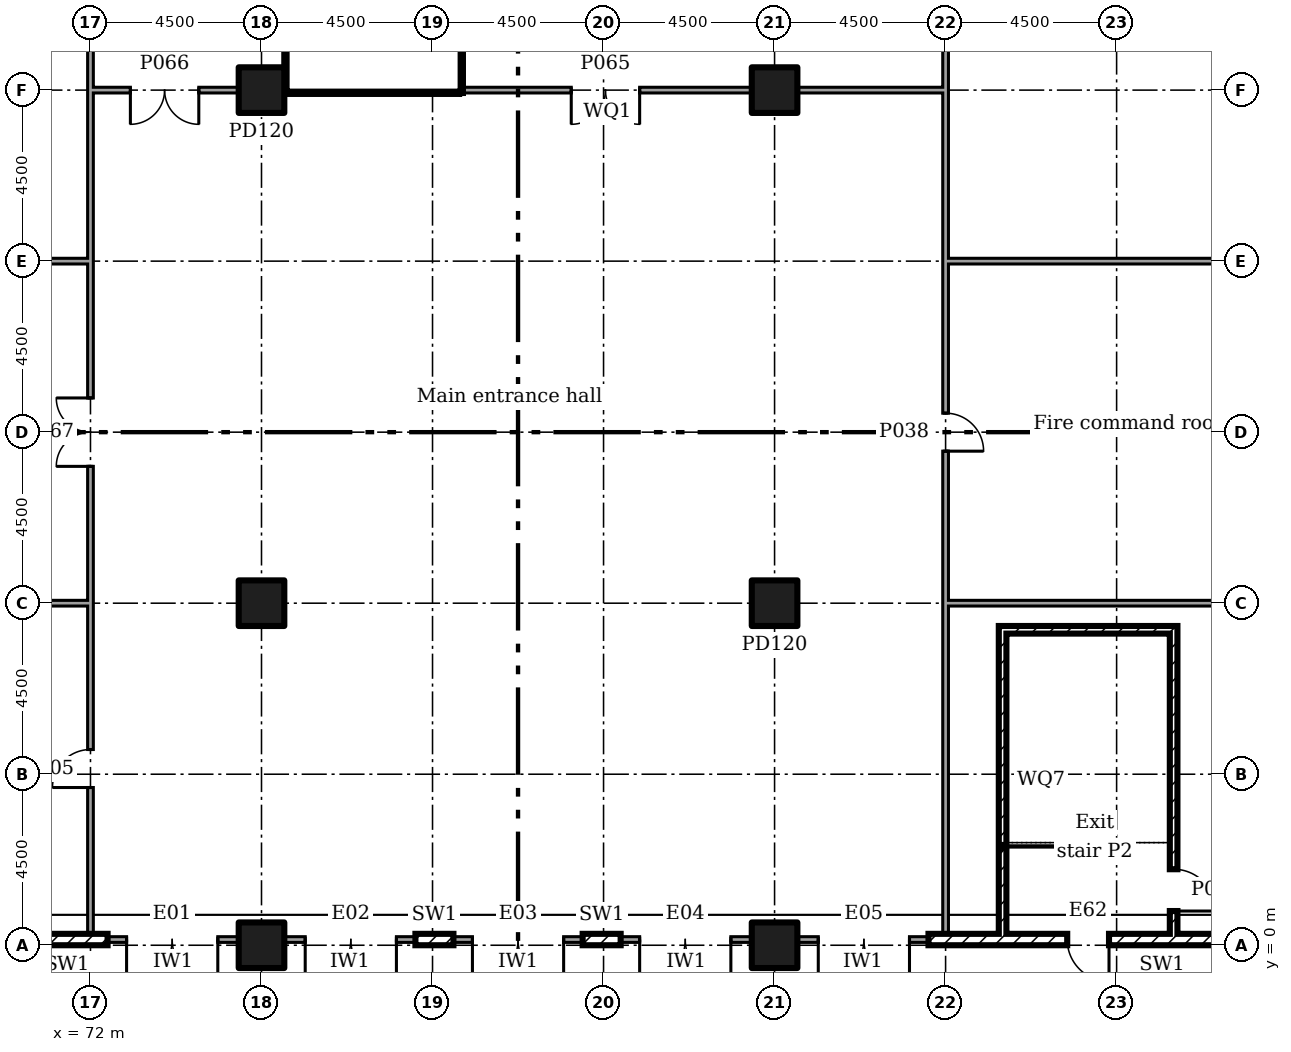
"""IFC4 building model, lengths in metres.
Left out: names, types, materials, properties, quantities, classifications, styles, units other than length and angle.
Written with IfcOpenShell. Run it as: python <this file> out.ifc"""

import sys

from ifc_helpers import new_model, si_unit, direction, frame, frame_2d, origin, origin_2d, place, context, subcontext, project, spatial, rectangle, extrude, element, fill, save


model = new_model("IFC4")
c1 = context("Model", 3, precision=1e-05, world=origin(), true_north=direction((0.0, 1.0)))
c2 = subcontext(c1, "Body", "Model", "MODEL_VIEW")
j1 = project(units=[si_unit("LENGTHUNIT", "METRE"), si_unit("PLANEANGLEUNIT", "RADIAN")], contexts=[c1])
p1 = place(None, origin())
s1 = spatial("IfcSite", under=j1, at=p1, CompositionType="ELEMENT")
p2 = place(p1, origin())
s2 = spatial("IfcBuilding", under=s1, at=p2, CompositionType="ELEMENT")
p3 = place(p2, origin())
s3 = spatial("IfcBuildingStorey", under=s2, at=p3, CompositionType="ELEMENT", Elevation=0.0)
for number, where in (
    (1, (76.5, 0.0, 0.0)),
    (2, (76.5, 9.0, 0.0)),
    (3, (76.5, 22.5, 0.0)),
    (4, (90.0, 0.0, 0.0)),
    (5, (90.0, 9.0, 0.0)),
    (6, (90.0, 22.5, 0.0)),
):
    element("IfcColumn", number, at=place(p3, frame(where)), inside=s3, PredefinedType="COLUMN", context=c2, shape_type="SweptSolid", body=[
        extrude(rectangle(XDim=1.2, YDim=1.2, at=origin_2d()), origin(), (0.0, 0.0, 1.0), 6.0),
    ])
p4 = place(p3, frame((70.3, 0.15, 0.0)))
e7 = element("IfcWall", 7, at=p4, inside=s3, PredefinedType="ELEMENTEDWALL", context=c2, shape_type="SweptSolid", body=[
    extrude(rectangle(XDim=2.15, YDim=0.3, at=frame_2d((1.075, 0.0))), origin(), (0.0, 0.0, 1.0), 5.55),
])
p5 = place(p3, frame((72.45, 0.15, 0.0)))
e8 = element("IfcWall", 8, at=p5, inside=s3, PredefinedType="SOLIDWALL", context=c2, shape_type="SweptSolid", body=[
    extrude(rectangle(XDim=3.45, YDim=0.15, at=frame_2d((1.725, 0.0))), origin(), (0.0, 0.0, 1.0), 5.55),
])
p6 = place(p5, frame((0.5, 0.0, 0.0)))
e9 = element("IfcOpeningElement", 9, at=p6, cuts=e8, PredefinedType="OPENING", context=c2, shape_type="SweptSolid", body=[
    extrude(rectangle(XDim=2.4, YDim=2.7, at=frame_2d((1.2, 1.35))), frame((0.0, 0.085, 0.0), z_axis=(0.0, -1.0, 0.0), x_axis=(1.0, 0.0, 0.0)), (0.0, 0.0, 1.0), 0.17),
])
p7 = place(p3, frame((77.1, 0.15, 0.0)))
e10 = element("IfcWall", 10, at=p7, inside=s3, PredefinedType="SOLIDWALL", context=c2, shape_type="SweptSolid", body=[
    extrude(rectangle(XDim=3.45, YDim=0.15, at=frame_2d((1.725, 0.0))), origin(), (0.0, 0.0, 1.0), 5.55),
])
p8 = place(p7, frame((0.55, 0.0, 0.0)))
e11 = element("IfcOpeningElement", 11, at=p8, cuts=e10, PredefinedType="OPENING", context=c2, shape_type="SweptSolid", body=[
    extrude(rectangle(XDim=2.4, YDim=2.7, at=frame_2d((1.2, 1.35))), frame((0.0, 0.085, 0.0), z_axis=(0.0, -1.0, 0.0), x_axis=(1.0, 0.0, 0.0)), (0.0, 0.0, 1.0), 0.17),
])
p9 = place(p3, frame((80.55, 0.15, 0.0)))
e12 = element("IfcWall", 12, at=p9, inside=s3, PredefinedType="ELEMENTEDWALL", context=c2, shape_type="SweptSolid", body=[
    extrude(rectangle(XDim=1.0, YDim=0.3, at=frame_2d((0.5, 0.0))), origin(), (0.0, 0.0, 1.0), 5.55),
])
p10 = place(p3, frame((81.55, 0.15, 0.0)))
e13 = element("IfcWall", 13, at=p10, inside=s3, PredefinedType="SOLIDWALL", context=c2, shape_type="SweptSolid", body=[
    extrude(rectangle(XDim=3.4, YDim=0.15, at=frame_2d((1.7, 0.0))), origin(), (0.0, 0.0, 1.0), 5.55),
])
p11 = place(p10, frame((0.5, 0.0, 0.0)))
e14 = element("IfcOpeningElement", 14, at=p11, cuts=e13, PredefinedType="OPENING", context=c2, shape_type="SweptSolid", body=[
    extrude(rectangle(XDim=2.4, YDim=2.7, at=frame_2d((1.2, 1.35))), frame((0.0, 0.085, 0.0), z_axis=(0.0, -1.0, 0.0), x_axis=(1.0, 0.0, 0.0)), (0.0, 0.0, 1.0), 0.17),
])
p12 = place(p3, frame((84.95, 0.15, 0.0)))
e15 = element("IfcWall", 15, at=p12, inside=s3, PredefinedType="ELEMENTEDWALL", context=c2, shape_type="SweptSolid", body=[
    extrude(rectangle(XDim=1.0, YDim=0.3, at=frame_2d((0.5, 0.0))), origin(), (0.0, 0.0, 1.0), 5.55),
])
p13 = place(p3, frame((85.95, 0.15, 0.0)))
e16 = element("IfcWall", 16, at=p13, inside=s3, PredefinedType="SOLIDWALL", context=c2, shape_type="SweptSolid", body=[
    extrude(rectangle(XDim=3.45, YDim=0.15, at=frame_2d((1.725, 0.0))), origin(), (0.0, 0.0, 1.0), 5.55),
])
p14 = place(p13, frame((0.5, 0.0, 0.0)))
e17 = element("IfcOpeningElement", 17, at=p14, cuts=e16, PredefinedType="OPENING", context=c2, shape_type="SweptSolid", body=[
    extrude(rectangle(XDim=2.4, YDim=2.7, at=frame_2d((1.2, 1.35))), frame((0.0, 0.085, 0.0), z_axis=(0.0, -1.0, 0.0), x_axis=(1.0, 0.0, 0.0)), (0.0, 0.0, 1.0), 0.17),
])
p15 = place(p3, frame((90.6, 0.15, 0.0)))
e18 = element("IfcWall", 18, at=p15, inside=s3, PredefinedType="SOLIDWALL", context=c2, shape_type="SweptSolid", body=[
    extrude(rectangle(XDim=3.45, YDim=0.15, at=frame_2d((1.725, 0.0))), origin(), (0.0, 0.0, 1.0), 5.55),
])
p16 = place(p15, frame((0.55, 0.0, 0.0)))
e19 = element("IfcOpeningElement", 19, at=p16, cuts=e18, PredefinedType="OPENING", context=c2, shape_type="SweptSolid", body=[
    extrude(rectangle(XDim=2.4, YDim=2.7, at=frame_2d((1.2, 1.35))), frame((0.0, 0.085, 0.0), z_axis=(0.0, -1.0, 0.0), x_axis=(1.0, 0.0, 0.0)), (0.0, 0.0, 1.0), 0.17),
])
p17 = place(p3, frame((94.05, 0.15, 0.0)))
e20 = element("IfcWall", 20, at=p17, inside=s3, PredefinedType="ELEMENTEDWALL", context=c2, shape_type="SweptSolid", body=[
    extrude(rectangle(XDim=3.15, YDim=0.3, at=frame_2d((1.575, 0.0))), origin(), (0.0, 0.0, 1.0), 5.55),
])
p18 = place(p3, frame((97.2, 0.15, 0.0)))
e21 = element("IfcWall", 21, at=p18, inside=s3, PredefinedType="ELEMENTEDWALL", context=c2, shape_type="SweptSolid", body=[
    extrude(rectangle(XDim=2.1, YDim=0.3, at=frame_2d((1.05, 0.0))), origin(), (0.0, 0.0, 1.0), 5.55),
])
p19 = place(p18, frame((0.5, 0.0, 0.0)))
e22 = element("IfcOpeningElement", 22, at=p19, cuts=e21, PredefinedType="OPENING", context=c2, shape_type="SweptSolid", body=[
    extrude(rectangle(XDim=1.1, YDim=2.4, at=frame_2d((0.55, 1.2))), frame((0.0, 0.16, 0.0), z_axis=(0.0, -1.0, 0.0), x_axis=(1.0, 0.0, 0.0)), (0.0, 0.0, 1.0), 0.32),
])
p20 = place(p3, frame((99.3, 0.15, 0.0)))
e23 = element("IfcWall", 23, at=p20, inside=s3, PredefinedType="ELEMENTEDWALL", context=c2, shape_type="SweptSolid", body=[
    extrude(rectangle(XDim=3.6, YDim=0.3, at=frame_2d((1.8, 0.0))), origin(), (0.0, 0.0, 1.0), 5.55),
])
p21 = place(p3, frame((71.925, 22.5, 0.0)))
e24 = element("IfcWall", 24, at=p21, inside=s3, PredefinedType="PARTITIONING", context=c2, shape_type="SweptSolid", body=[
    extrude(rectangle(XDim=3.98, YDim=0.15, at=frame_2d((1.99, 0.0))), origin(), (0.0, 0.0, 1.0), 5.55),
])
p22 = place(p21, frame((1.125, 0.0, 0.0)))
e25 = element("IfcOpeningElement", 25, at=p22, cuts=e24, PredefinedType="OPENING", context=c2, shape_type="SweptSolid", body=[
    extrude(rectangle(XDim=1.8, YDim=2.1, at=frame_2d((0.9, 1.05))), frame((0.0, 0.085, 0.0), z_axis=(0.0, -1.0, 0.0), x_axis=(1.0, 0.0, 0.0)), (0.0, 0.0, 1.0), 0.17),
])
p23 = place(p3, frame((81.8, 22.5, 0.0)))
e26 = element("IfcWall", 26, at=p23, inside=s3, PredefinedType="PARTITIONING", context=c2, shape_type="SweptSolid", body=[
    extrude(rectangle(XDim=7.605, YDim=0.15, at=frame_2d((3.802, 0.0))), origin(), (0.0, 0.0, 1.0), 5.55),
])
p24 = place(p23, frame((2.85, 0.0, 0.0)))
e27 = element("IfcOpeningElement", 27, at=p24, cuts=e26, PredefinedType="OPENING", context=c2, shape_type="SweptSolid", body=[
    extrude(rectangle(XDim=1.8, YDim=2.1, at=frame_2d((0.9, 1.05))), frame((0.0, 0.085, 0.0), z_axis=(0.0, -1.0, 0.0), x_axis=(1.0, 0.0, 0.0)), (0.0, 0.0, 1.0), 0.17),
])
p25 = place(p3, frame((90.595, 22.5, 0.0)))
e28 = element("IfcWall", 28, at=p25, inside=s3, PredefinedType="PARTITIONING", context=c2, shape_type="SweptSolid", body=[
    extrude(rectangle(XDim=3.98, YDim=0.15, at=frame_2d((1.99, 0.0))), origin(), (0.0, 0.0, 1.0), 5.55),
])
p26 = place(p3, frame((72.0, 0.3, 0.0), z_axis=(0.0, 0.0, 1.0), x_axis=(0.0, 1.0, 0.0)))
e29 = element("IfcWall", 29, at=p26, inside=s3, PredefinedType="PARTITIONING", context=c2, shape_type="SweptSolid", body=[
    extrude(rectangle(XDim=8.775, YDim=0.15, at=frame_2d((4.387, 0.0))), origin(), (0.0, 0.0, 1.0), 5.55),
])
p27 = place(p26, frame((3.85, 0.0, 0.0)))
e30 = element("IfcOpeningElement", 30, at=p27, cuts=e29, PredefinedType="OPENING", context=c2, shape_type="SweptSolid", body=[
    extrude(rectangle(XDim=1.0, YDim=2.1, at=frame_2d((0.5, 1.05))), frame((0.0, 0.085, 0.0), z_axis=(0.0, -1.0, 0.0), x_axis=(1.0, 0.0, 0.0)), (0.0, 0.0, 1.0), 0.17),
])
p28 = place(p3, frame((72.0, 9.0, 0.0), z_axis=(0.0, 0.0, 1.0), x_axis=(0.0, 1.0, 0.0)))
e31 = element("IfcWall", 31, at=p28, inside=s3, PredefinedType="PARTITIONING", context=c2, shape_type="SweptSolid", body=[
    extrude(rectangle(XDim=9.075, YDim=0.15, at=frame_2d((4.538, 0.0))), origin(), (0.0, 0.0, 1.0), 5.55),
])
p29 = place(p28, frame((3.6, 0.0, 0.0)))
e32 = element("IfcOpeningElement", 32, at=p29, cuts=e31, PredefinedType="OPENING", context=c2, shape_type="SweptSolid", body=[
    extrude(rectangle(XDim=1.8, YDim=2.1, at=frame_2d((0.9, 1.05))), frame((0.0, 0.085, 0.0), z_axis=(0.0, -1.0, 0.0), x_axis=(1.0, 0.0, 0.0)), (0.0, 0.0, 1.0), 0.17),
])
p30 = place(p3, frame((72.0, 18.0, 0.0), z_axis=(0.0, 0.0, 1.0), x_axis=(0.0, 1.0, 0.0)))
e33 = element("IfcWall", 33, at=p30, inside=s3, PredefinedType="PARTITIONING", context=c2, shape_type="SweptSolid", body=[
    extrude(rectangle(XDim=4.425, YDim=0.15, at=frame_2d((2.212, 0.0))), origin(), (0.0, 0.0, 1.0), 5.55),
])
p31 = place(p3, frame((94.5, 0.3, 0.0), z_axis=(0.0, 0.0, 1.0), x_axis=(0.0, 1.0, 0.0)))
e34 = element("IfcWall", 34, at=p31, inside=s3, PredefinedType="PARTITIONING", context=c2, shape_type="SweptSolid", body=[
    extrude(rectangle(XDim=8.775, YDim=0.15, at=frame_2d((4.387, 0.0))), origin(), (0.0, 0.0, 1.0), 5.55),
])
p32 = place(p3, frame((94.5, 9.0, 0.0), z_axis=(0.0, 0.0, 1.0), x_axis=(0.0, 1.0, 0.0)))
e35 = element("IfcWall", 35, at=p32, inside=s3, PredefinedType="PARTITIONING", context=c2, shape_type="SweptSolid", body=[
    extrude(rectangle(XDim=9.075, YDim=0.15, at=frame_2d((4.538, 0.0))), origin(), (0.0, 0.0, 1.0), 5.55),
])
p33 = place(p32, frame((4.0, 0.0, 0.0)))
e36 = element("IfcOpeningElement", 36, at=p33, cuts=e35, PredefinedType="OPENING", context=c2, shape_type="SweptSolid", body=[
    extrude(rectangle(XDim=1.0, YDim=2.1, at=frame_2d((0.5, 1.05))), frame((0.0, 0.085, 0.0), z_axis=(0.0, -1.0, 0.0), x_axis=(1.0, 0.0, 0.0)), (0.0, 0.0, 1.0), 0.17),
])
p34 = place(p3, frame((94.5, 18.0, 0.0), z_axis=(0.0, 0.0, 1.0), x_axis=(0.0, 1.0, 0.0)))
e37 = element("IfcWall", 37, at=p34, inside=s3, PredefinedType="PARTITIONING", context=c2, shape_type="SweptSolid", body=[
    extrude(rectangle(XDim=4.425, YDim=0.15, at=frame_2d((2.212, 0.0))), origin(), (0.0, 0.0, 1.0), 5.55),
])
p35 = place(p3, frame((77.1, 22.5, 0.0)))
e38 = element("IfcWall", 38, at=p35, inside=s3, PredefinedType="SOLIDWALL", context=c2, shape_type="SweptSolid", body=[
    extrude(rectangle(XDim=4.6, YDim=0.2, at=frame_2d((2.3, 0.0))), origin(), (0.0, 0.0, 1.0), 5.55),
])
p36 = place(p3, frame((72.0, 22.5, 0.0), z_axis=(0.0, 0.0, 1.0), x_axis=(0.0, 1.0, 0.0)))
e39 = element("IfcWall", 39, at=p36, inside=s3, PredefinedType="PARTITIONING", context=c2, shape_type="SweptSolid", body=[
    extrude(rectangle(XDim=4.575, YDim=0.15, at=frame_2d((2.288, 0.0))), origin(), (0.0, 0.0, 1.0), 5.55),
])
p37 = place(p3, frame((94.5, 22.5, 0.0), z_axis=(0.0, 0.0, 1.0), x_axis=(0.0, 1.0, 0.0)))
e40 = element("IfcWall", 40, at=p37, inside=s3, PredefinedType="PARTITIONING", context=c2, shape_type="SweptSolid", body=[
    extrude(rectangle(XDim=4.5, YDim=0.15, at=frame_2d((2.25, 0.0))), origin(), (0.0, 0.0, 1.0), 5.55),
])
p38 = place(p3, frame((77.2, 22.6, 0.0), z_axis=(0.0, 0.0, 1.0), x_axis=(0.0, 1.0, 0.0)))
e41 = element("IfcWall", 41, at=p38, inside=s3, PredefinedType="SOLIDWALL", context=c2, shape_type="SweptSolid", body=[
    extrude(rectangle(XDim=9.0, YDim=0.2, at=frame_2d((4.5, 0.0))), origin(), (0.0, 0.0, 1.0), 5.55),
])
p39 = place(p38, frame((7.3, 0.0, 0.0)))
e42 = element("IfcOpeningElement", 42, at=p39, cuts=e41, PredefinedType="OPENING", context=c2, shape_type="SweptSolid", body=[
    extrude(rectangle(XDim=1.1, YDim=2.1, at=frame_2d((0.55, 1.05))), frame((0.0, 0.11, 0.0), z_axis=(0.0, -1.0, 0.0), x_axis=(1.0, 0.0, 0.0)), (0.0, 0.0, 1.0), 0.22),
])
p40 = place(p3, frame((81.7, 22.425, 0.0), z_axis=(0.0, 0.0, 1.0), x_axis=(0.0, 1.0, 0.0)))
e43 = element("IfcWall", 43, at=p40, inside=s3, PredefinedType="SOLIDWALL", context=c2, shape_type="SweptSolid", body=[
    extrude(rectangle(XDim=9.175, YDim=0.2, at=frame_2d((4.587, 0.0))), origin(), (0.0, 0.0, 1.0), 5.55),
])
p41 = place(p3, frame((63.595, 9.0, 0.0)))
e44 = element("IfcWall", 44, at=p41, inside=s3, PredefinedType="PARTITIONING", context=c2, shape_type="SweptSolid", body=[
    extrude(rectangle(XDim=8.33, YDim=0.15, at=frame_2d((4.165, 0.0))), origin(), (0.0, 0.0, 1.0), 5.55),
])
p42 = place(p3, frame((61.5, 18.0, 0.0)))
e45 = element("IfcWall", 45, at=p42, inside=s3, PredefinedType="PARTITIONING", context=c2, shape_type="SweptSolid", body=[
    extrude(rectangle(XDim=10.425, YDim=0.15, at=frame_2d((5.212, 0.0))), origin(), (0.0, 0.0, 1.0), 5.55),
])
p43 = place(p42, frame((4.75, 0.0, 0.0)))
e46 = element("IfcOpeningElement", 46, at=p43, cuts=e45, PredefinedType="OPENING", context=c2, shape_type="SweptSolid", body=[
    extrude(rectangle(XDim=1.0, YDim=2.1, at=frame_2d((0.5, 1.05))), frame((0.0, 0.085, 0.0), z_axis=(0.0, -1.0, 0.0), x_axis=(1.0, 0.0, 0.0)), (0.0, 0.0, 1.0), 0.17),
])
p44 = place(p3, frame((94.575, 9.0, 0.0)))
e47 = element("IfcWall", 47, at=p44, inside=s3, PredefinedType="PARTITIONING", context=c2, shape_type="SweptSolid", body=[
    extrude(rectangle(XDim=8.33, YDim=0.15, at=frame_2d((4.165, 0.0))), origin(), (0.0, 0.0, 1.0), 5.55),
])
p45 = place(p3, frame((96.0, 0.3, 0.0), z_axis=(0.0, 0.0, 1.0), x_axis=(0.0, 1.0, 0.0)))
e48 = element("IfcWall", 48, at=p45, inside=s3, PredefinedType="SOLIDWALL", context=c2, shape_type="SweptSolid", body=[
    extrude(rectangle(XDim=8.1, YDim=0.2, at=frame_2d((4.05, 0.0))), origin(), (0.0, 0.0, 1.0), 5.55),
])
p46 = place(p3, frame((100.5, 0.3, 0.0), z_axis=(0.0, 0.0, 1.0), x_axis=(0.0, 1.0, 0.0)))
e49 = element("IfcWall", 49, at=p46, inside=s3, PredefinedType="SOLIDWALL", context=c2, shape_type="SweptSolid", body=[
    extrude(rectangle(XDim=8.1, YDim=0.2, at=frame_2d((4.05, 0.0))), origin(), (0.0, 0.0, 1.0), 5.55),
])
p47 = place(p46, frame((0.6, 0.0, 0.0)))
e50 = element("IfcOpeningElement", 50, at=p47, cuts=e49, PredefinedType="OPENING", context=c2, shape_type="SweptSolid", body=[
    extrude(rectangle(XDim=1.1, YDim=2.1, at=frame_2d((0.55, 1.05))), frame((0.0, 0.11, 0.0), z_axis=(0.0, -1.0, 0.0), x_axis=(1.0, 0.0, 0.0)), (0.0, 0.0, 1.0), 0.22),
])
p48 = place(p3, frame((96.1, 8.3, 0.0)))
e51 = element("IfcWall", 51, at=p48, inside=s3, PredefinedType="SOLIDWALL", context=c2, shape_type="SweptSolid", body=[
    extrude(rectangle(XDim=4.3, YDim=0.2, at=frame_2d((2.15, 0.0))), origin(), (0.0, 0.0, 1.0), 5.55),
])
p49 = place(p3, frame((94.575, 18.0, 0.0)))
e52 = element("IfcWall", 52, at=p49, inside=s3, PredefinedType="PARTITIONING", context=c2, shape_type="SweptSolid", body=[
    extrude(rectangle(XDim=8.85, YDim=0.15, at=frame_2d((4.425, 0.0))), origin(), (0.0, 0.0, 1.0), 5.55),
])
p50 = place(p3, frame((81.6, 23.2, 0.0), z_axis=(0.0, 0.0, 1.0), x_axis=(-1.0, 0.0, 0.0)))
e53 = element("IfcWall", 53, at=p50, inside=s3, PredefinedType="SOLIDWALL", context=c2, shape_type="SweptSolid", body=[
    extrude(rectangle(XDim=4.3, YDim=0.2, at=frame_2d((2.15, 0.0))), origin(), (0.0, 0.0, 1.0), 2.8),
])
p51 = place(p6, frame((2.4, 0.0, 0.0), x_axis=(-1.0, 0.0, 0.0)))
e54 = element("IfcDoor", 54, at=p51, inside=s3, OperationType="DOUBLE_DOOR_DOUBLE_SWING", PredefinedType="NOTDEFINED", context=c2, shape_type="SweptSolid", body=[
    extrude(rectangle(XDim=2.4, YDim=2.7, at=frame_2d((1.2, 1.35))), frame((0.0, 0.025, 0.0), z_axis=(0.0, -1.0, 0.0), x_axis=(1.0, 0.0, 0.0)), (0.0, 0.0, 1.0), 0.05),
])
fill(e9, e54)
p52 = place(p8, frame((2.4, 0.0, 0.0), x_axis=(-1.0, 0.0, 0.0)))
e55 = element("IfcDoor", 55, at=p52, inside=s3, OperationType="DOUBLE_DOOR_DOUBLE_SWING", PredefinedType="NOTDEFINED", context=c2, shape_type="SweptSolid", body=[
    extrude(rectangle(XDim=2.4, YDim=2.7, at=frame_2d((1.2, 1.35))), frame((0.0, 0.025, 0.0), z_axis=(0.0, -1.0, 0.0), x_axis=(1.0, 0.0, 0.0)), (0.0, 0.0, 1.0), 0.05),
])
fill(e11, e55)
p53 = place(p11, frame((2.4, 0.0, 0.0), x_axis=(-1.0, 0.0, 0.0)))
e56 = element("IfcDoor", 56, at=p53, inside=s3, OperationType="DOUBLE_DOOR_DOUBLE_SWING", PredefinedType="NOTDEFINED", context=c2, shape_type="SweptSolid", body=[
    extrude(rectangle(XDim=2.4, YDim=2.7, at=frame_2d((1.2, 1.35))), frame((0.0, 0.025, 0.0), z_axis=(0.0, -1.0, 0.0), x_axis=(1.0, 0.0, 0.0)), (0.0, 0.0, 1.0), 0.05),
])
fill(e14, e56)
p54 = place(p14, frame((2.4, 0.0, 0.0), x_axis=(-1.0, 0.0, 0.0)))
e57 = element("IfcDoor", 57, at=p54, inside=s3, OperationType="DOUBLE_DOOR_DOUBLE_SWING", PredefinedType="NOTDEFINED", context=c2, shape_type="SweptSolid", body=[
    extrude(rectangle(XDim=2.4, YDim=2.7, at=frame_2d((1.2, 1.35))), frame((0.0, 0.025, 0.0), z_axis=(0.0, -1.0, 0.0), x_axis=(1.0, 0.0, 0.0)), (0.0, 0.0, 1.0), 0.05),
])
fill(e17, e57)
p55 = place(p16, frame((2.4, 0.0, 0.0), x_axis=(-1.0, 0.0, 0.0)))
e58 = element("IfcDoor", 58, at=p55, inside=s3, OperationType="DOUBLE_DOOR_DOUBLE_SWING", PredefinedType="NOTDEFINED", context=c2, shape_type="SweptSolid", body=[
    extrude(rectangle(XDim=2.4, YDim=2.7, at=frame_2d((1.2, 1.35))), frame((0.0, 0.025, 0.0), z_axis=(0.0, -1.0, 0.0), x_axis=(1.0, 0.0, 0.0)), (0.0, 0.0, 1.0), 0.05),
])
fill(e19, e58)
p56 = place(p19, frame((1.1, 0.0, 0.0), x_axis=(-1.0, 0.0, 0.0)))
e59 = element("IfcDoor", 59, at=p56, inside=s3, OperationType="SINGLE_SWING_RIGHT", PredefinedType="NOTDEFINED", context=c2, shape_type="SweptSolid", body=[
    extrude(rectangle(XDim=1.1, YDim=2.4, at=frame_2d((0.55, 1.2))), frame((0.0, 0.025, 0.0), z_axis=(0.0, -1.0, 0.0), x_axis=(1.0, 0.0, 0.0)), (0.0, 0.0, 1.0), 0.05),
])
fill(e22, e59)
p57 = place(p27, origin())
e60 = element("IfcDoor", 60, at=p57, inside=s3, OperationType="SINGLE_SWING_RIGHT", PredefinedType="DOOR", context=c2, shape_type="SweptSolid", body=[
    extrude(rectangle(XDim=1.0, YDim=2.1, at=frame_2d((0.5, 1.05))), frame((0.0, 0.025, 0.0), z_axis=(0.0, -1.0, 0.0), x_axis=(1.0, 0.0, 0.0)), (0.0, 0.0, 1.0), 0.05),
])
fill(e30, e60)
p58 = place(p33, frame((1.0, 0.0, 0.0), x_axis=(-1.0, 0.0, 0.0)))
e61 = element("IfcDoor", 61, at=p58, inside=s3, OperationType="SINGLE_SWING_LEFT", PredefinedType="DOOR", context=c2, shape_type="SweptSolid", body=[
    extrude(rectangle(XDim=1.0, YDim=2.1, at=frame_2d((0.5, 1.05))), frame((0.0, 0.025, 0.0), z_axis=(0.0, -1.0, 0.0), x_axis=(1.0, 0.0, 0.0)), (0.0, 0.0, 1.0), 0.05),
])
fill(e36, e61)
p59 = place(p47, frame((1.1, 0.0, 0.0), x_axis=(-1.0, 0.0, 0.0)))
e62 = element("IfcDoor", 62, at=p59, inside=s3, OperationType="SINGLE_SWING_LEFT", PredefinedType="DOOR", context=c2, shape_type="SweptSolid", body=[
    extrude(rectangle(XDim=1.1, YDim=2.1, at=frame_2d((0.55, 1.05))), frame((0.0, 0.025, 0.0), z_axis=(0.0, -1.0, 0.0), x_axis=(1.0, 0.0, 0.0)), (0.0, 0.0, 1.0), 0.05),
])
fill(e50, e62)
p60 = place(p24, frame((1.8, 0.0, 0.0), x_axis=(-1.0, 0.0, 0.0)))
e63 = element("IfcDoor", 63, at=p60, inside=s3, OperationType="DOUBLE_DOOR_SINGLE_SWING", PredefinedType="DOOR", context=c2, shape_type="SweptSolid", body=[
    extrude(rectangle(XDim=1.8, YDim=2.1, at=frame_2d((0.9, 1.05))), frame((0.0, 0.025, 0.0), z_axis=(0.0, -1.0, 0.0), x_axis=(1.0, 0.0, 0.0)), (0.0, 0.0, 1.0), 0.05),
])
fill(e27, e63)
p61 = place(p22, frame((1.8, 0.0, 0.0), x_axis=(-1.0, 0.0, 0.0)))
e64 = element("IfcDoor", 64, at=p61, inside=s3, OperationType="DOUBLE_DOOR_SINGLE_SWING", PredefinedType="DOOR", context=c2, shape_type="SweptSolid", body=[
    extrude(rectangle(XDim=1.8, YDim=2.1, at=frame_2d((0.9, 1.05))), frame((0.0, 0.025, 0.0), z_axis=(0.0, -1.0, 0.0), x_axis=(1.0, 0.0, 0.0)), (0.0, 0.0, 1.0), 0.05),
])
fill(e25, e64)
p62 = place(p29, origin())
e65 = element("IfcDoor", 65, at=p62, inside=s3, OperationType="DOUBLE_DOOR_SINGLE_SWING", PredefinedType="DOOR", context=c2, shape_type="SweptSolid", body=[
    extrude(rectangle(XDim=1.8, YDim=2.1, at=frame_2d((0.9, 1.05))), frame((0.0, 0.025, 0.0), z_axis=(0.0, -1.0, 0.0), x_axis=(1.0, 0.0, 0.0)), (0.0, 0.0, 1.0), 0.05),
])
fill(e32, e65)
save(model, sys.argv[1])
